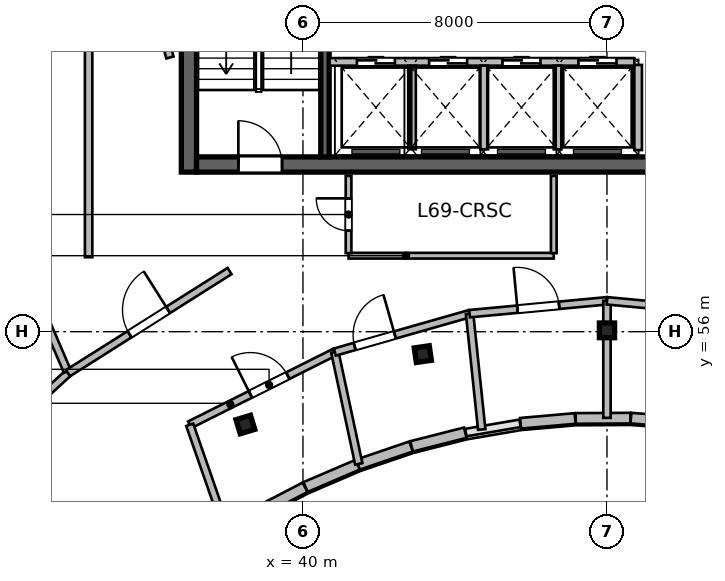
"""IFC4 building model, lengths in metres.
Left out: names, types, materials, properties, quantities, classifications, styles, units other than length and angle.
Written with IfcOpenShell. Run it as: python <this file> out.ifc"""

import sys

from ifc_helpers import new_model, si_unit, direction, frame, frame_2d, origin, origin_2d, place, context, subcontext, project, spatial, rectangle, i_section, extrude, source, transform, mapped, element, fill, save


model = new_model("IFC4")
c1 = context("Model", 3, precision=1e-05, world=origin(), true_north=direction((0.0, 1.0)))
c2 = subcontext(c1, "Body", "Model", "MODEL_VIEW")
j1 = project(units=[si_unit("LENGTHUNIT", "METRE"), si_unit("PLANEANGLEUNIT", "RADIAN")], contexts=[c1])
p1 = place(None, origin())
s1 = spatial("IfcSite", under=j1, at=p1, CompositionType="ELEMENT")
p2 = place(p1, origin())
s2 = spatial("IfcBuilding", under=s1, at=p2, CompositionType="ELEMENT")
p3 = place(p2, frame((0.0, 0.0, 283.5)))
s3 = spatial("IfcBuildingStorey", under=s2, at=p3, CompositionType="ELEMENT", Elevation=283.5)
m1 = source(origin(), c2, "Body", "SweptSolid", [
    extrude(rectangle(XDim=12.0, YDim=0.4, at=frame_2d((6.0, 0.0))), origin(), (0.0, 0.0, 1.0), 3.9),
])
p4 = place(p3, frame((37.0, 60.2, 0.0), z_axis=(0.0, 0.0, 1.0), x_axis=(0.0, 1.0, 0.0)))
e1 = element("IfcWall", 1, at=p4, inside=s3, PredefinedType="SHEAR", context=c2, shape_type="MappedRepresentation", body=[
    mapped(m1, transform((0.0, 0.0, 0.0), scale=1.0)),
])
m2 = source(origin(), c2, "Body", "SweptSolid", [
    extrude(rectangle(XDim=21.6, YDim=0.4, at=frame_2d((10.8, 0.0))), origin(), (0.0, 0.0, 1.0), 3.9),
])
p5 = place(p3, frame((37.2, 60.4, 0.0), z_axis=(0.0, 0.0, 1.0), x_axis=(1.0, 0.0, 0.0)))
e2 = element("IfcWall", 2, at=p5, inside=s3, PredefinedType="SHEAR", context=c2, shape_type="MappedRepresentation", body=[
    mapped(m2, transform((0.0, 0.0, 0.0), scale=1.0)),
])
p6 = place(p5, frame((1.1, 0.0, 0.0)))
e3 = element("IfcOpeningElement", 3, at=p6, cuts=e2, PredefinedType="OPENING", context=c2, shape_type="SweptSolid", body=[
    extrude(rectangle(XDim=1.15, YDim=2.15, at=frame_2d((0.575, 1.075))), frame((0.0, 0.21, 0.0), z_axis=(0.0, -1.0, 0.0), x_axis=(1.0, 0.0, 0.0)), (0.0, 0.0, 1.0), 0.42),
])
p7 = place(p5, frame((19.5, 0.0, 0.0)))
e4 = element("IfcOpeningElement", 4, at=p7, cuts=e2, PredefinedType="OPENING", context=c2, shape_type="SweptSolid", body=[
    extrude(rectangle(XDim=0.9, YDim=2.1, at=frame_2d((0.45, 1.05))), frame((0.0, 0.21, 0.0), z_axis=(0.0, -1.0, 0.0), x_axis=(1.0, 0.0, 0.0)), (0.0, 0.0, 1.0), 0.42),
])
p8 = place(p5, frame((12.02, 0.0, 0.0)))
e5 = element("IfcOpeningElement", 5, at=p8, cuts=e2, PredefinedType="OPENING", context=c2, shape_type="SweptSolid", body=[
    extrude(rectangle(XDim=1.6, YDim=2.15, at=frame_2d((0.8, 1.075))), frame((0.0, 0.21, 0.0), z_axis=(0.0, -1.0, 0.0), x_axis=(1.0, 0.0, 0.0)), (0.0, 0.0, 1.0), 0.42),
])
m3 = source(origin(), c2, "Body", "SweptSolid", [
    extrude(rectangle(XDim=11.2, YDim=0.22, at=frame_2d((5.6, 0.0))), origin(), (0.0, 0.0, 1.0), 3.9),
])
p9 = place(p3, frame((40.58, 60.6, 0.0), z_axis=(0.0, 0.0, 1.0), x_axis=(0.0, 1.0, 0.0)))
e6 = element("IfcWall", 6, at=p9, inside=s3, PredefinedType="SHEAR", context=c2, shape_type="MappedRepresentation", body=[
    mapped(m3, transform((0.0, 0.0, 0.0), scale=1.0)),
])
m4 = source(origin(), c2, "Body", "SweptSolid", [
    extrude(i_section(OverallWidth=0.399, OverallDepth=0.387, WebThickness=0.021, FlangeThickness=0.033, at=origin_2d()), origin(), (0.0, 0.0, 1.0), 3.9),
])
for number, where, z_axis, x_axis in (
    (7, (38.485, 53.558, 0.0), (0.0, 0.0, 1.0), (-0.289, 0.957, 0.0)),
    (8, (43.154, 55.411, 0.0), (0.0, 0.0, 1.0), (-0.143, 0.99, 0.0)),
    (9, (48.0, 56.036, 0.0), (0.0, 0.0, 1.0), (0.0, 1.0, 0.0)),
):
    element("IfcColumn", number, at=place(p3, frame(where, z_axis=z_axis, x_axis=x_axis)), inside=s3, PredefinedType="COLUMN", context=c2, shape_type="MappedRepresentation", body=[
        mapped(m4, transform((0.0, 0.0, 0.0), scale=1.0)),
    ])
m5 = source(origin(), c2, "Body", "SweptSolid", [
    extrude(rectangle(XDim=1.44, YDim=0.28, at=frame_2d((0.72, 0.0))), origin(), (0.0, 0.0, 1.0), 3.64),
])
p10 = place(p3, frame((50.066, 53.616, 0.0), z_axis=(0.0, 0.0, 1.0), x_axis=(-0.997124860794, 0.075776064736, 0.0)))
e10 = element("IfcWall", 10, at=p10, inside=s3, PredefinedType="SOLIDWALL", context=c2, shape_type="MappedRepresentation", body=[
    mapped(m5, transform((0.0, 0.0, 0.0), scale=1.0)),
])
m6 = source(origin(), c2, "Body", "SweptSolid", [
    extrude(rectangle(XDim=1.438, YDim=0.28, at=frame_2d((0.719, 0.0))), origin(), (0.0, 0.0, 1.0), 3.64),
])
p11 = place(p3, frame((48.615, 53.726, 0.0), z_axis=(0.0, 0.0, 1.0), x_axis=(-0.999982357135, -0.005940153174, 0.0)))
e11 = element("IfcWall", 11, at=p11, inside=s3, PredefinedType="SOLIDWALL", context=c2, shape_type="MappedRepresentation", body=[
    mapped(m6, transform((0.0, 0.0, 0.0), scale=1.0)),
])
m7 = source(origin(), c2, "Body", "SweptSolid", [
    extrude(rectangle(XDim=1.441, YDim=0.28, at=frame_2d((0.72, 0.0))), origin(), (0.0, 0.0, 1.0), 3.64),
])
p12 = place(p3, frame((47.162, 53.717, 0.0), z_axis=(0.0, 0.0, 1.0), x_axis=(-0.99617032352, -0.087433898101, 0.0)))
e12 = element("IfcWall", 12, at=p12, inside=s3, PredefinedType="SOLIDWALL", context=c2, shape_type="MappedRepresentation", body=[
    mapped(m7, transform((0.0, 0.0, 0.0), scale=1.0)),
])
m8 = source(origin(), c2, "Body", "SweptSolid", [
    extrude(rectangle(XDim=1.458, YDim=0.28, at=frame_2d((0.729, 0.0))), origin(), (0.0, 0.0, 1.0), 3.64),
])
p13 = place(p3, frame((44.271, 53.343, 0.0), z_axis=(0.0, 0.0, 1.0), x_axis=(-0.969109544438, -0.246630677083, 0.0)))
e13 = element("IfcWall", 13, at=p13, inside=s3, PredefinedType="SOLIDWALL", context=c2, shape_type="MappedRepresentation", body=[
    mapped(m8, transform((0.0, 0.0, 0.0), scale=1.0)),
])
m9 = source(origin(), c2, "Body", "SweptSolid", [
    extrude(rectangle(XDim=1.473, YDim=0.28, at=frame_2d((0.736, 0.0))), origin(), (0.0, 0.0, 1.0), 3.64),
])
p14 = place(p3, frame((42.845, 52.979, 0.0), z_axis=(0.0, 0.0, 1.0), x_axis=(-0.946641296917, -0.322289086026, 0.0)))
e14 = element("IfcWall", 14, at=p14, inside=s3, PredefinedType="SOLIDWALL", context=c2, shape_type="MappedRepresentation", body=[
    mapped(m9, transform((0.0, 0.0, 0.0), scale=1.0)),
])
m10 = source(origin(), c2, "Body", "SweptSolid", [
    extrude(rectangle(XDim=1.49, YDim=0.28, at=frame_2d((0.745, 0.0))), origin(), (0.0, 0.0, 1.0), 3.64),
])
p15 = place(p3, frame((41.438, 52.5, 0.0), z_axis=(0.0, 0.0, 1.0), x_axis=(-0.919009427656, -0.394235553799, 0.0)))
e15 = element("IfcWall", 15, at=p15, inside=s3, PredefinedType="SOLIDWALL", context=c2, shape_type="MappedRepresentation", body=[
    mapped(m10, transform((0.0, 0.0, 0.0), scale=1.0)),
])
m11 = source(origin(), c2, "Body", "SweptSolid", [
    extrude(rectangle(XDim=1.512, YDim=0.28, at=frame_2d((0.756, 0.0))), origin(), (0.0, 0.0, 1.0), 3.64),
])
p16 = place(p3, frame((40.056, 51.906, 0.0), z_axis=(0.0, 0.0, 1.0), x_axis=(-0.886841011195, -0.462074691865, 0.0)))
e16 = element("IfcWall", 16, at=p16, inside=s3, PredefinedType="SOLIDWALL", context=c2, shape_type="MappedRepresentation", body=[
    mapped(m11, transform((0.0, 0.0, 0.0), scale=1.0)),
])
m12 = source(origin(), c2, "Body", "SweptSolid", [
    extrude(rectangle(XDim=2.24, YDim=0.2, at=frame_2d((1.12, 0.0))), origin(), (0.0, 0.0, 1.0), 3.64),
])
p17 = place(p3, frame((48.82, 60.78, 0.0), z_axis=(0.0, 0.0, 1.0), x_axis=(0.0, 1.0, 0.0)))
e17 = element("IfcWall", 17, at=p17, inside=s3, PredefinedType="SOLIDWALL", context=c2, shape_type="MappedRepresentation", body=[
    mapped(m12, transform((0.0, 0.0, 0.0), scale=1.0)),
])
m13 = source(origin(), c2, "Body", "SweptSolid", [
    extrude(rectangle(XDim=8.02, YDim=0.2, at=frame_2d((4.01, 0.0))), origin(), (0.0, 0.0, 1.0), 3.64),
])
p18 = place(p3, frame((40.7, 63.1, 0.0), z_axis=(0.0, 0.0, 1.0), x_axis=(1.0, 0.0, 0.0)))
e18 = element("IfcWall", 18, at=p18, inside=s3, PredefinedType="SOLIDWALL", context=c2, shape_type="MappedRepresentation", body=[
    mapped(m13, transform((0.0, 0.0, 0.0), scale=1.0)),
])
p19 = place(p18, frame((0.72, 0.0, 0.0)))
e19 = element("IfcOpeningElement", 19, at=p19, cuts=e18, PredefinedType="OPENING", context=c2, shape_type="SweptSolid", body=[
    extrude(rectangle(XDim=1.0, YDim=2.15, at=frame_2d((0.5, 1.075))), frame((0.0, 0.11, 0.0), z_axis=(0.0, -1.0, 0.0), x_axis=(1.0, 0.0, 0.0)), (0.0, 0.0, 1.0), 0.22),
])
p20 = place(p18, frame((2.62, 0.0, 0.0)))
e20 = element("IfcOpeningElement", 20, at=p20, cuts=e18, PredefinedType="OPENING", context=c2, shape_type="SweptSolid", body=[
    extrude(rectangle(XDim=1.0, YDim=2.15, at=frame_2d((0.5, 1.075))), frame((0.0, 0.11, 0.0), z_axis=(0.0, -1.0, 0.0), x_axis=(1.0, 0.0, 0.0)), (0.0, 0.0, 1.0), 0.22),
])
p21 = place(p18, frame((4.55, 0.0, 0.0)))
e21 = element("IfcOpeningElement", 21, at=p21, cuts=e18, PredefinedType="OPENING", context=c2, shape_type="SweptSolid", body=[
    extrude(rectangle(XDim=1.0, YDim=2.15, at=frame_2d((0.5, 1.075))), frame((0.0, 0.11, 0.0), z_axis=(0.0, -1.0, 0.0), x_axis=(1.0, 0.0, 0.0)), (0.0, 0.0, 1.0), 0.22),
])
p22 = place(p18, frame((6.55, 0.0, 0.0)))
e22 = element("IfcOpeningElement", 22, at=p22, cuts=e18, PredefinedType="OPENING", context=c2, shape_type="SweptSolid", body=[
    extrude(rectangle(XDim=1.0, YDim=2.15, at=frame_2d((0.5, 1.075))), frame((0.0, 0.11, 0.0), z_axis=(0.0, -1.0, 0.0), x_axis=(1.0, 0.0, 0.0)), (0.0, 0.0, 1.0), 0.22),
])
m14 = source(origin(), c2, "Body", "SweptSolid", [
    extrude(rectangle(XDim=2.2, YDim=0.2, at=frame_2d((1.1, 0.0))), origin(), (0.0, 0.0, 1.0), 3.64),
])
for number, where, z_axis, x_axis in (
    (23, (42.87, 60.8, 0.0), (0.0, 0.0, 1.0), (0.0, 1.0, 0.0)),
    (24, (44.77, 60.8, 0.0), (0.0, 0.0, 1.0), (0.0, 1.0, 0.0)),
    (25, (46.7, 60.8, 0.0), (0.0, 0.0, 1.0), (0.0, 1.0, 0.0)),
):
    element("IfcWall", number, at=place(p3, frame(where, z_axis=z_axis, x_axis=x_axis)), inside=s3, PredefinedType="SOLIDWALL", context=c2, shape_type="MappedRepresentation", body=[
        mapped(m14, transform((0.0, 0.0, 0.0), scale=1.0)),
    ])
m15 = source(origin(), c2, "Body", "SweptSolid", [
    extrude(rectangle(XDim=5.4, YDim=0.15, at=frame_2d((2.7, 0.0))), origin(), (0.0, 0.0, 1.0), 3.64),
])
p23 = place(p3, frame((41.2, 58.0, 0.0), z_axis=(0.0, 0.0, 1.0), x_axis=(1.0, 0.0, 0.0)))
e26 = element("IfcWall", 26, at=p23, inside=s3, PredefinedType="PARTITIONING", context=c2, shape_type="MappedRepresentation", body=[
    mapped(m15, transform((0.0, 0.0, 0.0), scale=1.0)),
])
m16 = source(origin(), c2, "Body", "SweptSolid", [
    extrude(rectangle(XDim=2.033, YDim=0.15, at=frame_2d((1.016, 0.0))), origin(), (0.0, 0.0, 1.0), 3.64),
])
p24 = place(p3, frame((41.2, 58.067, 0.0), z_axis=(0.0, 0.0, 1.0), x_axis=(0.0, 1.0, 0.0)))
e27 = element("IfcWall", 27, at=p24, inside=s3, PredefinedType="PARTITIONING", context=c2, shape_type="MappedRepresentation", body=[
    mapped(m16, transform((0.0, 0.0, 0.0), scale=1.0)),
])
p25 = place(p24, frame((0.591, 0.0, 0.0)))
e28 = element("IfcOpeningElement", 28, at=p25, cuts=e27, PredefinedType="OPENING", context=c2, shape_type="SweptSolid", body=[
    extrude(rectangle(XDim=0.85, YDim=2.1, at=frame_2d((0.425, 1.05))), frame((0.0, 0.085, 0.0), z_axis=(0.0, -1.0, 0.0), x_axis=(1.0, 0.0, 0.0)), (0.0, 0.0, 1.0), 0.17),
])
p26 = place(p3, frame((46.6, 58.067, 0.0), z_axis=(0.0, 0.0, 1.0), x_axis=(0.0, 1.0, 0.0)))
e29 = element("IfcWall", 29, at=p26, inside=s3, PredefinedType="PARTITIONING", context=c2, shape_type="MappedRepresentation", body=[
    mapped(m16, transform((0.0, 0.0, 0.0), scale=1.0)),
])
m17 = source(origin(), c2, "Body", "SweptSolid", [
    extrude(rectangle(XDim=4.271, YDim=0.195, at=frame_2d((2.135, 0.0))), origin(), (0.0, 0.0, 1.0), 3.64),
])
p27 = place(p3, frame((37.021, 53.552, 0.0), z_axis=(0.0, 0.0, 1.0), x_axis=(0.894061035522, 0.447945158207, 0.0)))
e30 = element("IfcWall", 30, at=p27, inside=s3, PredefinedType="PARTITIONING", context=c2, shape_type="MappedRepresentation", body=[
    mapped(m17, transform((0.0, 0.0, 0.0), scale=1.0)),
])
p28 = place(p27, frame((1.785, 0.0, 0.0)))
e31 = element("IfcOpeningElement", 31, at=p28, cuts=e30, PredefinedType="OPENING", context=c2, shape_type="SweptSolid", body=[
    extrude(rectangle(XDim=1.1, YDim=2.15, at=frame_2d((0.55, 1.075))), frame((0.0, 0.107, 0.0), z_axis=(0.0, -1.0, 0.0), x_axis=(1.0, 0.0, 0.0)), (0.0, 0.0, 1.0), 0.215),
])
m18 = source(origin(), c2, "Body", "SweptSolid", [
    extrude(rectangle(XDim=2.944, YDim=0.195, at=frame_2d((1.472, 0.0))), origin(), (0.0, 0.0, 1.0), 3.64),
])
p29 = place(p3, frame((37.988, 50.771, 0.0), z_axis=(0.0, 0.0, 1.0), x_axis=(-0.328565655286, 0.944481132774, 0.0)))
e32 = element("IfcWall", 32, at=p29, inside=s3, PredefinedType="PARTITIONING", context=c2, shape_type="MappedRepresentation", body=[
    mapped(m18, transform((0.0, 0.0, 0.0), scale=1.0)),
])
m19 = source(origin(), c2, "Body", "SweptSolid", [
    extrude(rectangle(XDim=3.01, YDim=0.195, at=frame_2d((1.505, 0.0))), origin(), (0.0, 0.0, 1.0), 3.64),
])
p30 = place(p3, frame((41.469, 52.521, 0.0), z_axis=(0.0, 0.0, 1.0), x_axis=(-0.209279797988, 0.977855800287, 0.0)))
e33 = element("IfcWall", 33, at=p30, inside=s3, PredefinedType="PARTITIONING", context=c2, shape_type="MappedRepresentation", body=[
    mapped(m19, transform((0.0, 0.0, 0.0), scale=1.0)),
])
m20 = source(origin(), c2, "Body", "SweptSolid", [
    extrude(rectangle(XDim=3.687, YDim=0.195, at=frame_2d((1.843, 0.0))), origin(), (0.0, 0.0, 1.0), 3.64),
])
p31 = place(p3, frame((40.839, 55.465, 0.0), z_axis=(0.0, 0.0, 1.0), x_axis=(0.961753532248, 0.27391630694, 0.0)))
e34 = element("IfcWall", 34, at=p31, inside=s3, PredefinedType="PARTITIONING", context=c2, shape_type="MappedRepresentation", body=[
    mapped(m20, transform((0.0, 0.0, 0.0), scale=1.0)),
])
p32 = place(p31, frame((0.543, 0.0, 0.0)))
e35 = element("IfcOpeningElement", 35, at=p32, cuts=e34, PredefinedType="OPENING", context=c2, shape_type="SweptSolid", body=[
    extrude(rectangle(XDim=1.1, YDim=2.15, at=frame_2d((0.55, 1.075))), frame((0.0, 0.107, 0.0), z_axis=(0.0, -1.0, 0.0), x_axis=(1.0, 0.0, 0.0)), (0.0, 0.0, 1.0), 0.215),
])
m21 = source(origin(), c2, "Body", "SweptSolid", [
    extrude(rectangle(XDim=3.063, YDim=0.195, at=frame_2d((1.532, 0.0))), origin(), (0.0, 0.0, 1.0), 3.64),
])
p33 = place(p3, frame((44.704, 53.427, 0.0), z_axis=(0.0, 0.0, 1.0), x_axis=(-0.104315578516, 0.994544247421, 0.0)))
e36 = element("IfcWall", 36, at=p33, inside=s3, PredefinedType="PARTITIONING", context=c2, shape_type="MappedRepresentation", body=[
    mapped(m21, transform((0.0, 0.0, 0.0), scale=1.0)),
])
m22 = source(origin(), c2, "Body", "SweptSolid", [
    extrude(rectangle(XDim=3.632, YDim=0.195, at=frame_2d((1.816, 0.0))), origin(), (0.0, 0.0, 1.0), 3.64),
])
p34 = place(p3, frame((44.384, 56.474, 0.0), z_axis=(0.0, 0.0, 1.0), x_axis=(0.99563695898, 0.093311552942, 0.0)))
e37 = element("IfcWall", 37, at=p34, inside=s3, PredefinedType="PARTITIONING", context=c2, shape_type="MappedRepresentation", body=[
    mapped(m22, transform((0.0, 0.0, 0.0), scale=1.0)),
])
p35 = place(p34, frame((1.266, 0.0, 0.0)))
e38 = element("IfcOpeningElement", 38, at=p35, cuts=e37, PredefinedType="OPENING", context=c2, shape_type="SweptSolid", body=[
    extrude(rectangle(XDim=1.1, YDim=2.15, at=frame_2d((0.55, 1.075))), frame((0.0, 0.107, 0.0), z_axis=(0.0, -1.0, 0.0), x_axis=(1.0, 0.0, 0.0)), (0.0, 0.0, 1.0), 0.215),
])
m23 = source(origin(), c2, "Body", "SweptSolid", [
    extrude(rectangle(XDim=3.081, YDim=0.195, at=frame_2d((1.54, 0.0))), origin(), (0.0, 0.0, 1.0), 3.314),
])
p36 = place(p3, frame((48.0, 53.733, 0.0), z_axis=(0.0, 0.0, 1.0), x_axis=(0.0, 1.0, 0.0)))
e39 = element("IfcWall", 39, at=p36, inside=s3, PredefinedType="PARTITIONING", context=c2, shape_type="MappedRepresentation", body=[
    mapped(m23, transform((0.0, 0.0, 0.0), scale=1.0)),
])
p37 = place(p3, frame((48.0, 56.813, 0.0), z_axis=(0.0, 0.0, 1.0), x_axis=(0.99563695898, -0.093311552942, 0.0)))
e40 = element("IfcWall", 40, at=p37, inside=s3, PredefinedType="PARTITIONING", context=c2, shape_type="MappedRepresentation", body=[
    mapped(m22, transform((0.0, 0.0, 0.0), scale=1.0)),
])
p38 = place(p37, frame((1.466, 0.0, 0.0)))
e41 = element("IfcOpeningElement", 41, at=p38, cuts=e40, PredefinedType="OPENING", context=c2, shape_type="SweptSolid", body=[
    extrude(rectangle(XDim=1.1, YDim=2.15, at=frame_2d((0.55, 1.075))), frame((0.0, 0.107, 0.0), z_axis=(0.0, -1.0, 0.0), x_axis=(1.0, 0.0, 0.0)), (0.0, 0.0, 1.0), 0.215),
])
m24 = source(origin(), c2, "Body", "SweptSolid", [
    extrude(rectangle(XDim=4.986, YDim=0.195, at=frame_2d((2.493, 0.0))), origin(), (0.0, 0.0, 1.0), 3.64),
])
p39 = place(p3, frame((30.153, 51.533, 0.0), z_axis=(0.0, 0.0, 1.0), x_axis=(0.735595190169, 0.677421372707, 0.0)))
e42 = element("IfcWall", 42, at=p39, inside=s3, PredefinedType="PARTITIONING", context=c2, shape_type="MappedRepresentation", body=[
    mapped(m24, transform((0.0, 0.0, 0.0), scale=1.0)),
])
p40 = place(p39, frame((1.893, 0.0, 0.0)))
e43 = element("IfcOpeningElement", 43, at=p40, cuts=e42, PredefinedType="OPENING", context=c2, shape_type="SweptSolid", body=[
    extrude(rectangle(XDim=1.2, YDim=2.15, at=frame_2d((0.6, 1.075))), frame((0.0, 0.107, 0.0), z_axis=(0.0, -1.0, 0.0), x_axis=(1.0, 0.0, 0.0)), (0.0, 0.0, 1.0), 0.215),
])
m25 = source(origin(), c2, "Body", "SweptSolid", [
    extrude(rectangle(XDim=17.556, YDim=0.195, at=frame_2d((8.778, 0.0))), origin(), (0.0, 0.0, 1.0), 3.64),
])
p41 = place(p3, frame((33.8, 54.958, 0.0), z_axis=(0.0, 0.0, 1.0), x_axis=(-0.395687598313, 0.918385172213, 0.0)))
e44 = element("IfcWall", 44, at=p41, inside=s3, PredefinedType="PARTITIONING", context=c2, shape_type="MappedRepresentation", body=[
    mapped(m25, transform((0.0, 0.0, 0.0), scale=1.0)),
])
m26 = source(origin(), c2, "Body", "SweptSolid", [
    extrude(rectangle(XDim=5.025, YDim=0.195, at=frame_2d((2.513, 0.0))), origin(), (0.0, 0.0, 1.0), 3.64),
])
p42 = place(p3, frame((33.82, 54.911, 0.0), z_axis=(0.0, 0.0, 1.0), x_axis=(0.84532378062, 0.534254345717, 0.0)))
e45 = element("IfcWall", 45, at=p42, inside=s3, PredefinedType="PARTITIONING", context=c2, shape_type="MappedRepresentation", body=[
    mapped(m26, transform((0.0, 0.0, 0.0), scale=1.0)),
])
p43 = place(p42, frame((1.913, 0.0, 0.0)))
e46 = element("IfcOpeningElement", 46, at=p43, cuts=e45, PredefinedType="OPENING", context=c2, shape_type="SweptSolid", body=[
    extrude(rectangle(XDim=1.2, YDim=2.15, at=frame_2d((0.6, 1.075))), frame((0.0, 0.107, 0.0), z_axis=(0.0, -1.0, 0.0), x_axis=(1.0, 0.0, 0.0)), (0.0, 0.0, 1.0), 0.215),
])
m27 = source(origin(), c2, "Body", "SweptSolid", [
    extrude(rectangle(XDim=12.311, YDim=0.195, at=frame_2d((6.155, 0.0))), origin(), (0.0, 0.0, 1.0), 3.64),
])
p44 = place(p3, frame((36.5, 63.216, 0.0), z_axis=(0.0, 0.0, 1.0), x_axis=(-0.268759602651, 0.963207286093, 0.0)))
e47 = element("IfcWall", 47, at=p44, inside=s3, PredefinedType="PARTITIONING", context=c2, shape_type="MappedRepresentation", body=[
    mapped(m27, transform((0.0, 0.0, 0.0), scale=1.0)),
])
m28 = source(origin(), c2, "Body", "SweptSolid", [
    extrude(rectangle(XDim=17.681, YDim=0.195, at=frame_2d((8.84, 0.0))), origin(), (0.0, 0.0, 1.0), 3.64),
])
p45 = place(p3, frame((34.36, 57.96, 0.0), z_axis=(0.0, 0.0, 1.0), x_axis=(0.0, 1.0, 0.0)))
e48 = element("IfcWall", 48, at=p45, inside=s3, PredefinedType="PARTITIONING", context=c2, shape_type="MappedRepresentation", body=[
    mapped(m28, transform((0.0, 0.0, 0.0), scale=1.0)),
])
m29 = source(origin(), c2, "Body", "SweptSolid", [
    extrude(rectangle(XDim=1.15, YDim=2.15, at=frame_2d((0.575, 1.075))), frame((0.0, 0.025, 0.0), z_axis=(0.0, -1.0, 0.0), x_axis=(1.0, 0.0, 0.0)), (0.0, 0.0, 1.0), 0.05),
])
p46 = place(p6, origin())
e49 = element("IfcDoor", 49, at=p46, inside=s3, OperationType="SINGLE_SWING_LEFT", PredefinedType="DOOR", context=c2, shape_type="MappedRepresentation", body=[
    mapped(m29, transform((0.0, 0.0, 0.0), scale=1.0)),
])
fill(e3, e49)
m30 = source(origin(), c2, "Body", "SweptSolid", [
    extrude(rectangle(XDim=1.0, YDim=2.15, at=frame_2d((0.5, 1.075))), frame((0.0, 0.025, 0.0), z_axis=(0.0, -1.0, 0.0), x_axis=(1.0, 0.0, 0.0)), (0.0, 0.0, 1.0), 0.05),
])
p47 = place(p19, origin())
e50 = element("IfcDoor", 50, at=p47, inside=s3, OperationType="DOUBLE_DOOR_SLIDING", PredefinedType="DOOR", context=c2, shape_type="MappedRepresentation", body=[
    mapped(m30, transform((0.0, 0.0, 0.0), scale=1.0)),
])
fill(e19, e50)
p48 = place(p20, origin())
e51 = element("IfcDoor", 51, at=p48, inside=s3, OperationType="DOUBLE_DOOR_SLIDING", PredefinedType="DOOR", context=c2, shape_type="MappedRepresentation", body=[
    mapped(m30, transform((0.0, 0.0, 0.0), scale=1.0)),
])
fill(e20, e51)
p49 = place(p21, origin())
e52 = element("IfcDoor", 52, at=p49, inside=s3, OperationType="DOUBLE_DOOR_SLIDING", PredefinedType="DOOR", context=c2, shape_type="MappedRepresentation", body=[
    mapped(m30, transform((0.0, 0.0, 0.0), scale=1.0)),
])
fill(e21, e52)
p50 = place(p22, origin())
e53 = element("IfcDoor", 53, at=p50, inside=s3, OperationType="DOUBLE_DOOR_SLIDING", PredefinedType="DOOR", context=c2, shape_type="MappedRepresentation", body=[
    mapped(m30, transform((0.0, 0.0, 0.0), scale=1.0)),
])
fill(e22, e53)
m31 = source(origin(), c2, "Body", "SweptSolid", [
    extrude(rectangle(XDim=0.85, YDim=2.1, at=frame_2d((0.425, 1.05))), frame((0.0, 0.025, 0.0), z_axis=(0.0, -1.0, 0.0), x_axis=(1.0, 0.0, 0.0)), (0.0, 0.0, 1.0), 0.05),
])
p51 = place(p25, origin())
e54 = element("IfcDoor", 54, at=p51, inside=s3, OperationType="SINGLE_SWING_RIGHT", PredefinedType="DOOR", context=c2, shape_type="MappedRepresentation", body=[
    mapped(m31, transform((0.0, 0.0, 0.0), scale=1.0)),
])
fill(e28, e54)
m32 = source(origin(), c2, "Body", "SweptSolid", [
    extrude(rectangle(XDim=1.1, YDim=2.15, at=frame_2d((0.55, 1.075))), frame((0.0, 0.025, 0.0), z_axis=(0.0, -1.0, 0.0), x_axis=(1.0, 0.0, 0.0)), (0.0, 0.0, 1.0), 0.05),
])
p52 = place(p28, origin())
e55 = element("IfcDoor", 55, at=p52, inside=s3, OperationType="SINGLE_SWING_LEFT", PredefinedType="DOOR", context=c2, shape_type="MappedRepresentation", body=[
    mapped(m32, transform((0.0, 0.0, 0.0), scale=1.0)),
])
fill(e31, e55)
p53 = place(p32, origin())
e56 = element("IfcDoor", 56, at=p53, inside=s3, OperationType="SINGLE_SWING_RIGHT", PredefinedType="DOOR", context=c2, shape_type="MappedRepresentation", body=[
    mapped(m32, transform((0.0, 0.0, 0.0), scale=1.0)),
])
fill(e35, e56)
p54 = place(p35, origin())
e57 = element("IfcDoor", 57, at=p54, inside=s3, OperationType="SINGLE_SWING_LEFT", PredefinedType="DOOR", context=c2, shape_type="MappedRepresentation", body=[
    mapped(m32, transform((0.0, 0.0, 0.0), scale=1.0)),
])
fill(e38, e57)
m33 = source(origin(), c2, "Body", "SweptSolid", [
    extrude(rectangle(XDim=1.2, YDim=2.15, at=frame_2d((0.6, 1.075))), frame((0.0, 0.025, 0.0), z_axis=(0.0, -1.0, 0.0), x_axis=(1.0, 0.0, 0.0)), (0.0, 0.0, 1.0), 0.05),
])
p55 = place(p43, origin())
e58 = element("IfcDoor", 58, at=p55, inside=s3, OperationType="SINGLE_SWING_RIGHT", PredefinedType="DOOR", context=c2, shape_type="MappedRepresentation", body=[
    mapped(m33, transform((0.0, 0.0, 0.0), scale=1.0)),
])
fill(e46, e58)
save(model, sys.argv[1])
